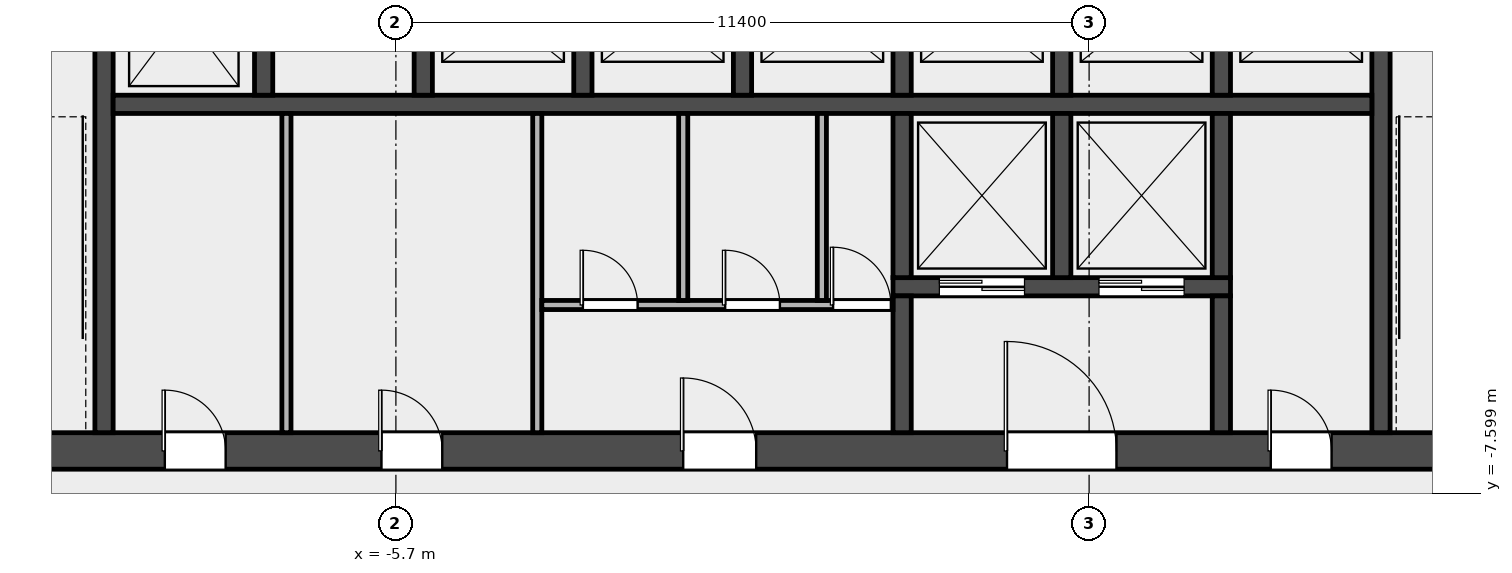
"""IFC4 building model, lengths in metres.
Left out: names, types, materials, properties, quantities, classifications, styles, units other than length and angle.
Written with IfcOpenShell. Run it as: python <this file> out.ifc"""

import sys

from ifc_helpers import new_model, si_unit, direction, frame, frame_2d, origin, place, context, subcontext, project, spatial, rectangle, extrude, element, fill, save


model = new_model("IFC4")
c1 = context("Model", 3, precision=1e-05, world=origin(), true_north=direction((0.0, 1.0)))
c2 = subcontext(c1, "Body", "Model", "MODEL_VIEW")
j1 = project(units=[si_unit("LENGTHUNIT", "METRE"), si_unit("PLANEANGLEUNIT", "RADIAN")], contexts=[c1])
p1 = place(None, origin())
s1 = spatial("IfcSite", under=j1, at=p1, CompositionType="ELEMENT")
p2 = place(p1, origin())
s2 = spatial("IfcBuilding", under=s1, at=p2, CompositionType="ELEMENT")
p3 = place(p2, frame((0.0, 0.0, 50.2)))
s3 = spatial("IfcBuildingStorey", under=s2, at=p3, CompositionType="ELEMENT", Elevation=50.2)
p4 = place(p3, frame((-14.4, -6.9, 0.0), z_axis=(0.0, 0.0, 1.0), x_axis=(1.0, 0.0, 0.0)))
e1 = element("IfcWall", 1, at=p4, inside=s3, PredefinedType="SHEAR", context=c2, shape_type="SweptSolid", body=[
    extrude(rectangle(XDim=28.8, YDim=0.6, at=frame_2d((14.4, 0.0))), origin(), (0.0, 0.0, 1.0), 4.5),
])
p5 = place(p4, frame((4.9, 0.0, 0.0)))
e2 = element("IfcOpeningElement", 2, at=p5, cuts=e1, PredefinedType="OPENING", context=c2, shape_type="SweptSolid", body=[
    extrude(rectangle(XDim=1.0, YDim=2.1, at=frame_2d((0.5, 1.05))), frame((0.0, 0.312, 0.0), z_axis=(0.0, -1.0, 0.0), x_axis=(1.0, 0.0, 0.0)), (0.0, 0.0, 1.0), 0.624),
])
p6 = place(p4, frame((8.462, 0.0, 0.0)))
e3 = element("IfcOpeningElement", 3, at=p6, cuts=e1, PredefinedType="OPENING", context=c2, shape_type="SweptSolid", body=[
    extrude(rectangle(XDim=1.0, YDim=2.1, at=frame_2d((0.5, 1.05))), frame((0.0, 0.312, 0.0), z_axis=(0.0, -1.0, 0.0), x_axis=(1.0, 0.0, 0.0)), (0.0, 0.0, 1.0), 0.624),
])
p7 = place(p4, frame((13.425, 0.0, 0.0)))
e4 = element("IfcOpeningElement", 4, at=p7, cuts=e1, PredefinedType="OPENING", context=c2, shape_type="SweptSolid", body=[
    extrude(rectangle(XDim=1.2, YDim=2.1, at=frame_2d((0.6, 1.05))), frame((0.0, 0.312, 0.0), z_axis=(0.0, -1.0, 0.0), x_axis=(1.0, 0.0, 0.0)), (0.0, 0.0, 1.0), 0.624),
])
p8 = place(p4, frame((18.75, 0.0, 0.0)))
e5 = element("IfcOpeningElement", 5, at=p8, cuts=e1, PredefinedType="OPENING", context=c2, shape_type="SweptSolid", body=[
    extrude(rectangle(XDim=1.8, YDim=2.1, at=frame_2d((0.9, 1.05))), frame((0.0, 0.312, 0.0), z_axis=(0.0, -1.0, 0.0), x_axis=(1.0, 0.0, 0.0)), (0.0, 0.0, 1.0), 0.624),
])
p9 = place(p4, frame((23.087, 0.0, 0.0)))
e6 = element("IfcOpeningElement", 6, at=p9, cuts=e1, PredefinedType="OPENING", context=c2, shape_type="SweptSolid", body=[
    extrude(rectangle(XDim=1.0, YDim=2.1, at=frame_2d((0.5, 1.05))), frame((0.0, 0.312, 0.0), z_axis=(0.0, -1.0, 0.0), x_axis=(1.0, 0.0, 0.0)), (0.0, 0.0, 1.0), 0.624),
])
for number, where, z_axis, x_axis in (
    (7, (-10.5, -6.6, 0.0), (0.0, 0.0, 1.0), (0.0, 1.0, 0.0)),
    (8, (10.5, -6.6, 0.0), (0.0, 0.0, 1.0), (0.0, 1.0, 0.0)),
):
    element("IfcWall", number, at=place(p3, frame(where, z_axis=z_axis, x_axis=x_axis)), inside=s3, PredefinedType="SHEAR", context=c2, shape_type="SweptSolid", body=[
        extrude(rectangle(XDim=8.55, YDim=0.3, at=frame_2d((4.275, 0.0))), origin(), (0.0, 0.0, 1.0), 4.5),
    ])
p10 = place(p3, frame((-10.35, -1.2, 0.0), z_axis=(0.0, 0.0, 1.0), x_axis=(1.0, 0.0, 0.0)))
e9 = element("IfcWall", 9, at=p10, inside=s3, PredefinedType="SOLIDWALL", context=c2, shape_type="SweptSolid", body=[
    extrude(rectangle(XDim=20.7, YDim=0.3, at=frame_2d((10.35, 0.0))), origin(), (0.0, 0.0, 1.0), 4.5),
])
for number, where, z_axis, x_axis in (
    (10, (-7.875, -1.05, 0.0), (0.0, 0.0, 1.0), (0.0, 1.0, 0.0)),
    (11, (-5.25, -1.05, 0.0), (0.0, 0.0, 1.0), (0.0, 1.0, 0.0)),
    (12, (-2.625, -1.05, 0.0), (0.0, 0.0, 1.0), (0.0, 1.0, 0.0)),
    (13, (0.0, -1.05, 0.0), (0.0, 0.0, 1.0), (0.0, 1.0, 0.0)),
    (14, (2.625, -1.05, 0.0), (0.0, 0.0, 1.0), (0.0, 1.0, 0.0)),
    (15, (5.25, -1.05, 0.0), (0.0, 0.0, 1.0), (0.0, 1.0, 0.0)),
    (16, (7.875, -1.05, 0.0), (0.0, 0.0, 1.0), (0.0, 1.0, 0.0)),
):
    element("IfcWall", number, at=place(p3, frame(where, z_axis=z_axis, x_axis=x_axis)), inside=s3, PredefinedType="SOLIDWALL", context=c2, shape_type="SweptSolid", body=[
        extrude(rectangle(XDim=2.7, YDim=0.3, at=frame_2d((1.35, 0.0))), origin(), (0.0, 0.0, 1.0), 4.5),
    ])
p11 = place(p3, frame((2.475, -4.2, 0.0), z_axis=(0.0, 0.0, 1.0), x_axis=(1.0, 0.0, 0.0)))
e17 = element("IfcWall", 17, at=p11, inside=s3, PredefinedType="SOLIDWALL", context=c2, shape_type="SweptSolid", body=[
    extrude(rectangle(XDim=5.55, YDim=0.3, at=frame_2d((2.775, 0.0))), origin(), (0.0, 0.0, 1.0), 4.5),
])
p12 = place(p11, frame((0.762, 0.0, 0.0)))
e18 = element("IfcOpeningElement", 18, at=p12, cuts=e17, PredefinedType="OPENING", context=c2, shape_type="SweptSolid", body=[
    extrude(rectangle(XDim=1.4, YDim=2.1, at=frame_2d((0.7, 1.05))), frame((0.0, 0.162, 0.0), z_axis=(0.0, -1.0, 0.0), x_axis=(1.0, 0.0, 0.0)), (0.0, 0.0, 1.0), 0.324),
])
p13 = place(p11, frame((3.387, 0.0, 0.0)))
e19 = element("IfcOpeningElement", 19, at=p13, cuts=e17, PredefinedType="OPENING", context=c2, shape_type="SweptSolid", body=[
    extrude(rectangle(XDim=1.4, YDim=2.1, at=frame_2d((0.7, 1.05))), frame((0.0, 0.162, 0.0), z_axis=(0.0, -1.0, 0.0), x_axis=(1.0, 0.0, 0.0)), (0.0, 0.0, 1.0), 0.324),
])
p14 = place(p3, frame((2.625, -4.05, 0.0), z_axis=(0.0, 0.0, 1.0), x_axis=(0.0, 1.0, 0.0)))
e20 = element("IfcWall", 20, at=p14, inside=s3, PredefinedType="SOLIDWALL", context=c2, shape_type="SweptSolid", body=[
    extrude(rectangle(XDim=2.7, YDim=0.3, at=frame_2d((1.35, 0.0))), origin(), (0.0, 0.0, 1.0), 4.5),
])
p15 = place(p3, frame((2.625, -6.6, 0.0), z_axis=(0.0, 0.0, 1.0), x_axis=(0.0, 1.0, 0.0)))
e21 = element("IfcWall", 21, at=p15, inside=s3, PredefinedType="SOLIDWALL", context=c2, shape_type="SweptSolid", body=[
    extrude(rectangle(XDim=2.25, YDim=0.3, at=frame_2d((1.125, 0.0))), origin(), (0.0, 0.0, 1.0), 4.5),
])
for number, where, z_axis, x_axis in (
    (22, (5.25, -4.05, 0.0), (0.0, 0.0, 1.0), (0.0, 1.0, 0.0)),
    (23, (7.875, -4.05, 0.0), (0.0, 0.0, 1.0), (0.0, 1.0, 0.0)),
):
    element("IfcWall", number, at=place(p3, frame(where, z_axis=z_axis, x_axis=x_axis)), inside=s3, PredefinedType="SOLIDWALL", context=c2, shape_type="SweptSolid", body=[
        extrude(rectangle(XDim=2.7, YDim=0.3, at=frame_2d((1.35, 0.0))), origin(), (0.0, 0.0, 1.0), 4.5),
    ])
p16 = place(p3, frame((7.875, -6.6, 0.0), z_axis=(0.0, 0.0, 1.0), x_axis=(0.0, 1.0, 0.0)))
e24 = element("IfcWall", 24, at=p16, inside=s3, PredefinedType="SOLIDWALL", context=c2, shape_type="SweptSolid", body=[
    extrude(rectangle(XDim=2.25, YDim=0.3, at=frame_2d((1.125, 0.0))), origin(), (0.0, 0.0, 1.0), 4.5),
])
for number, where, z_axis, x_axis in (
    (25, (-7.5, -6.6, 0.0), (0.0, 0.0, 1.0), (0.0, 1.0, 0.0)),
    (26, (-3.375, -6.6, 0.0), (0.0, 0.0, 1.0), (0.0, 1.0, 0.0)),
):
    element("IfcWall", number, at=place(p3, frame(where, z_axis=z_axis, x_axis=x_axis)), inside=s3, PredefinedType="PARTITIONING", context=c2, shape_type="SweptSolid", body=[
        extrude(rectangle(XDim=5.25, YDim=0.15, at=frame_2d((2.625, 0.0))), origin(), (0.0, 0.0, 1.0), 4.5),
    ])
p17 = place(p3, frame((-3.3, -4.5, 0.0), z_axis=(0.0, 0.0, 1.0), x_axis=(1.0, 0.0, 0.0)))
e27 = element("IfcWall", 27, at=p17, inside=s3, PredefinedType="PARTITIONING", context=c2, shape_type="SweptSolid", body=[
    extrude(rectangle(XDim=5.775, YDim=0.15, at=frame_2d((2.888, 0.0))), origin(), (0.0, 0.0, 1.0), 4.5),
])
p18 = place(p17, frame((0.675, 0.0, 0.0)))
e28 = element("IfcOpeningElement", 28, at=p18, cuts=e27, PredefinedType="OPENING", context=c2, shape_type="SweptSolid", body=[
    extrude(rectangle(XDim=0.9, YDim=2.1, at=frame_2d((0.45, 1.05))), frame((0.0, 0.087, 0.0), z_axis=(0.0, -1.0, 0.0), x_axis=(1.0, 0.0, 0.0)), (0.0, 0.0, 1.0), 0.174),
])
p19 = place(p17, frame((3.015, 0.0, 0.0)))
e29 = element("IfcOpeningElement", 29, at=p19, cuts=e27, PredefinedType="OPENING", context=c2, shape_type="SweptSolid", body=[
    extrude(rectangle(XDim=0.9, YDim=2.1, at=frame_2d((0.45, 1.05))), frame((0.0, 0.087, 0.0), z_axis=(0.0, -1.0, 0.0), x_axis=(1.0, 0.0, 0.0)), (0.0, 0.0, 1.0), 0.174),
])
p20 = place(p17, frame((4.79, 0.0, 0.0)))
e30 = element("IfcOpeningElement", 30, at=p20, cuts=e27, PredefinedType="OPENING", context=c2, shape_type="SweptSolid", body=[
    extrude(rectangle(XDim=0.95, YDim=2.1, at=frame_2d((0.475, 1.05))), frame((0.0, 0.087, 0.0), z_axis=(0.0, -1.0, 0.0), x_axis=(1.0, 0.0, 0.0)), (0.0, 0.0, 1.0), 0.174),
])
for number, where, z_axis, x_axis in (
    (31, (-0.975, -4.425, 0.0), (0.0, 0.0, 1.0), (0.0, 1.0, 0.0)),
    (32, (1.305, -4.425, 0.0), (0.0, 0.0, 1.0), (0.0, 1.0, 0.0)),
):
    element("IfcWall", number, at=place(p3, frame(where, z_axis=z_axis, x_axis=x_axis)), inside=s3, PredefinedType="PARTITIONING", context=c2, shape_type="SweptSolid", body=[
        extrude(rectangle(XDim=3.075, YDim=0.15, at=frame_2d((1.538, 0.0))), origin(), (0.0, 0.0, 1.0), 4.5),
    ])
p21 = place(p12, origin())
e33 = element("IfcDoor", 33, at=p21, inside=s3, OperationType="DOUBLE_DOOR_SLIDING", PredefinedType="DOOR", context=c2, shape_type="SweptSolid", body=[
    extrude(rectangle(XDim=1.4, YDim=2.1, at=frame_2d((0.7, 1.05))), frame((0.0, 0.025, 0.0), z_axis=(0.0, -1.0, 0.0), x_axis=(1.0, 0.0, 0.0)), (0.0, 0.0, 1.0), 0.05),
])
fill(e18, e33)
p22 = place(p13, origin())
e34 = element("IfcDoor", 34, at=p22, inside=s3, OperationType="DOUBLE_DOOR_SLIDING", PredefinedType="DOOR", context=c2, shape_type="SweptSolid", body=[
    extrude(rectangle(XDim=1.4, YDim=2.1, at=frame_2d((0.7, 1.05))), frame((0.0, 0.025, 0.0), z_axis=(0.0, -1.0, 0.0), x_axis=(1.0, 0.0, 0.0)), (0.0, 0.0, 1.0), 0.05),
])
fill(e19, e34)
p23 = place(p5, origin())
e35 = element("IfcDoor", 35, at=p23, inside=s3, OperationType="SINGLE_SWING_LEFT", PredefinedType="DOOR", context=c2, shape_type="SweptSolid", body=[
    extrude(rectangle(XDim=1.0, YDim=2.1, at=frame_2d((0.5, 1.05))), frame((0.0, 0.025, 0.0), z_axis=(0.0, -1.0, 0.0), x_axis=(1.0, 0.0, 0.0)), (0.0, 0.0, 1.0), 0.05),
])
fill(e2, e35)
p24 = place(p6, origin())
e36 = element("IfcDoor", 36, at=p24, inside=s3, OperationType="SINGLE_SWING_LEFT", PredefinedType="DOOR", context=c2, shape_type="SweptSolid", body=[
    extrude(rectangle(XDim=1.0, YDim=2.1, at=frame_2d((0.5, 1.05))), frame((0.0, 0.025, 0.0), z_axis=(0.0, -1.0, 0.0), x_axis=(1.0, 0.0, 0.0)), (0.0, 0.0, 1.0), 0.05),
])
fill(e3, e36)
p25 = place(p7, origin())
e37 = element("IfcDoor", 37, at=p25, inside=s3, OperationType="SINGLE_SWING_LEFT", PredefinedType="DOOR", context=c2, shape_type="SweptSolid", body=[
    extrude(rectangle(XDim=1.2, YDim=2.1, at=frame_2d((0.6, 1.05))), frame((0.0, 0.025, 0.0), z_axis=(0.0, -1.0, 0.0), x_axis=(1.0, 0.0, 0.0)), (0.0, 0.0, 1.0), 0.05),
])
fill(e4, e37)
p26 = place(p18, origin())
e38 = element("IfcDoor", 38, at=p26, inside=s3, OperationType="SINGLE_SWING_LEFT", PredefinedType="DOOR", context=c2, shape_type="SweptSolid", body=[
    extrude(rectangle(XDim=0.9, YDim=2.1, at=frame_2d((0.45, 1.05))), frame((0.0, 0.025, 0.0), z_axis=(0.0, -1.0, 0.0), x_axis=(1.0, 0.0, 0.0)), (0.0, 0.0, 1.0), 0.05),
])
fill(e28, e38)
p27 = place(p19, origin())
e39 = element("IfcDoor", 39, at=p27, inside=s3, OperationType="SINGLE_SWING_LEFT", PredefinedType="DOOR", context=c2, shape_type="SweptSolid", body=[
    extrude(rectangle(XDim=0.9, YDim=2.1, at=frame_2d((0.45, 1.05))), frame((0.0, 0.025, 0.0), z_axis=(0.0, -1.0, 0.0), x_axis=(1.0, 0.0, 0.0)), (0.0, 0.0, 1.0), 0.05),
])
fill(e29, e39)
p28 = place(p20, origin())
e40 = element("IfcDoor", 40, at=p28, inside=s3, OperationType="SINGLE_SWING_LEFT", PredefinedType="DOOR", context=c2, shape_type="SweptSolid", body=[
    extrude(rectangle(XDim=0.95, YDim=2.1, at=frame_2d((0.475, 1.05))), frame((0.0, 0.025, 0.0), z_axis=(0.0, -1.0, 0.0), x_axis=(1.0, 0.0, 0.0)), (0.0, 0.0, 1.0), 0.05),
])
fill(e30, e40)
p29 = place(p8, origin())
e41 = element("IfcDoor", 41, at=p29, inside=s3, OperationType="DOUBLE_DOOR_SINGLE_SWING", PredefinedType="DOOR", context=c2, shape_type="SweptSolid", body=[
    extrude(rectangle(XDim=1.8, YDim=2.1, at=frame_2d((0.9, 1.05))), frame((0.0, 0.025, 0.0), z_axis=(0.0, -1.0, 0.0), x_axis=(1.0, 0.0, 0.0)), (0.0, 0.0, 1.0), 0.05),
])
fill(e5, e41)
p30 = place(p9, origin())
e42 = element("IfcDoor", 42, at=p30, inside=s3, OperationType="SINGLE_SWING_LEFT", PredefinedType="DOOR", context=c2, shape_type="SweptSolid", body=[
    extrude(rectangle(XDim=1.0, YDim=2.1, at=frame_2d((0.5, 1.05))), frame((0.0, 0.025, 0.0), z_axis=(0.0, -1.0, 0.0), x_axis=(1.0, 0.0, 0.0)), (0.0, 0.0, 1.0), 0.05),
])
fill(e6, e42)
save(model, sys.argv[1])
